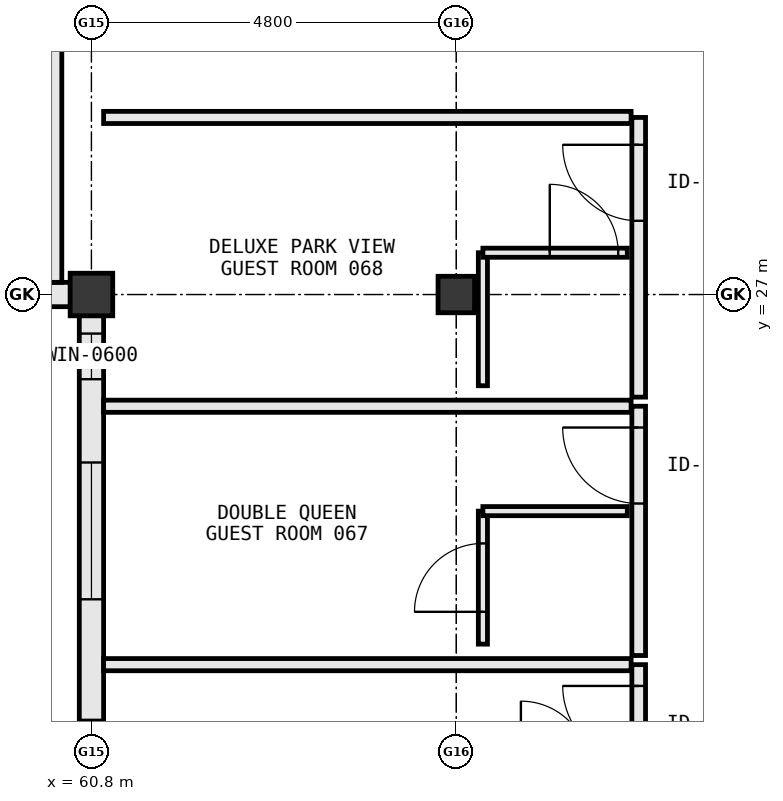
"""IFC4 building model, lengths in metres.
Left out: names, types, materials, properties, quantities, classifications, styles, units other than length and angle.
Written with IfcOpenShell. Run it as: python <this file> out.ifc"""

import sys

from ifc_helpers import new_model, si_unit, direction, frame, frame_2d, origin, origin_2d, place, context, subcontext, project, spatial, rectangle, extrude, element, fill, save


model = new_model("IFC4")
c1 = context("Model", 3, precision=1e-05, world=origin(), true_north=direction((0.0, 1.0)))
c2 = subcontext(c1, "Body", "Model", "MODEL_VIEW")
j1 = project(units=[si_unit("LENGTHUNIT", "METRE"), si_unit("PLANEANGLEUNIT", "RADIAN")], contexts=[c1])
p1 = place(None, origin())
s1 = spatial("IfcSite", under=j1, at=p1, CompositionType="ELEMENT")
p2 = place(p1, origin())
s2 = spatial("IfcBuilding", under=s1, at=p2, CompositionType="ELEMENT")
p3 = place(p2, frame((0.0, 0.0, 16.2)))
s3 = spatial("IfcBuildingStorey", under=s2, at=p3, CompositionType="ELEMENT", Elevation=16.2)
p4 = place(p3, frame((60.8, 27.0, 0.0), z_axis=(0.0, 0.0, 1.0), x_axis=(1.0, 0.0, 0.0)))
e1 = element("IfcColumn", 1, at=p4, inside=s3, PredefinedType="COLUMN", context=c2, shape_type="SweptSolid", body=[
    extrude(rectangle(XDim=0.56, YDim=0.56, at=origin_2d()), origin(), (0.0, 0.0, 1.0), 3.8),
])
p5 = place(p3, frame((65.6, 27.0, 0.0), z_axis=(0.0, 0.0, 1.0), x_axis=(1.0, 0.0, 0.0)))
e2 = element("IfcColumn", 2, at=p5, inside=s3, PredefinedType="COLUMN", context=c2, shape_type="SweptSolid", body=[
    extrude(rectangle(XDim=0.48, YDim=0.48, at=origin_2d()), origin(), (0.0, 0.0, 1.0), 3.8),
])
p6 = place(p3, frame((51.423, 27.0, 0.0), z_axis=(0.0, 0.0, 1.0), x_axis=(1.0, 0.0, 0.0)))
e3 = element("IfcWall", 3, at=p6, inside=s3, PredefinedType="STANDARD", context=c2, shape_type="SweptSolid", body=[
    extrude(rectangle(XDim=9.099, YDim=0.32, at=frame_2d((4.549, 0.0))), origin(), (0.0, 0.0, 1.0), 2.795),
])
p7 = place(p6, frame((1.675, 0.0, 0.85)))
e4 = element("IfcOpeningElement", 4, at=p7, cuts=e3, PredefinedType="OPENING", context=c2, shape_type="SweptSolid", body=[
    extrude(rectangle(XDim=1.2, YDim=1.55, at=frame_2d((0.6, 0.775))), frame((0.0, 0.172, 0.0), z_axis=(0.0, -1.0, 0.0), x_axis=(1.0, 0.0, 0.0)), (0.0, 0.0, 1.0), 0.344),
])
p8 = place(p6, frame((6.224, 0.0, 0.85)))
e5 = element("IfcOpeningElement", 5, at=p8, cuts=e3, PredefinedType="OPENING", context=c2, shape_type="SweptSolid", body=[
    extrude(rectangle(XDim=1.2, YDim=1.55, at=frame_2d((0.6, 0.775))), frame((0.0, 0.172, 0.0), z_axis=(0.0, -1.0, 0.0), x_axis=(1.0, 0.0, 0.0)), (0.0, 0.0, 1.0), 0.344),
])
p9 = place(p3, frame((60.8, 26.722, 0.0), z_axis=(0.0, 0.0, 1.0), x_axis=(0.0, -1.0, 0.0)))
e6 = element("IfcWall", 6, at=p9, inside=s3, PredefinedType="STANDARD", context=c2, shape_type="SweptSolid", body=[
    extrude(rectangle(XDim=7.844, YDim=0.32, at=frame_2d((3.922, 0.0))), origin(), (0.0, 0.0, 1.0), 3.015),
])
p10 = place(p9, frame((5.318, 0.0, 0.85)))
e7 = element("IfcOpeningElement", 7, at=p10, cuts=e6, PredefinedType="OPENING", context=c2, shape_type="SweptSolid", body=[
    extrude(rectangle(XDim=1.8, YDim=1.85, at=frame_2d((0.9, 0.925))), frame((0.0, 0.172, 0.0), z_axis=(0.0, -1.0, 0.0), x_axis=(1.0, 0.0, 0.0)), (0.0, 0.0, 1.0), 0.344),
])
p11 = place(p9, frame((1.932, 0.0, 0.85)))
e8 = element("IfcOpeningElement", 8, at=p11, cuts=e6, PredefinedType="OPENING", context=c2, shape_type="SweptSolid", body=[
    extrude(rectangle(XDim=1.8, YDim=1.85, at=frame_2d((0.9, 0.925))), frame((0.0, 0.172, 0.0), z_axis=(0.0, -1.0, 0.0), x_axis=(1.0, 0.0, 0.0)), (0.0, 0.0, 1.0), 0.344),
])
p12 = place(p9, frame((0.236, 0.0, 0.85)))
e9 = element("IfcOpeningElement", 9, at=p12, cuts=e6, PredefinedType="OPENING", context=c2, shape_type="SweptSolid", body=[
    extrude(rectangle(XDim=0.6, YDim=1.4, at=frame_2d((0.3, 0.7))), frame((0.0, 0.172, 0.0), z_axis=(0.0, -1.0, 0.0), x_axis=(1.0, 0.0, 0.0)), (0.0, 0.0, 1.0), 0.344),
])
p13 = place(p3, frame((68.0, 18.85, 0.0), z_axis=(0.0, 0.0, 1.0), x_axis=(0.0, 1.0, 0.0)))
e10 = element("IfcWall", 10, at=p13, inside=s3, PredefinedType="PARTITIONING", context=c2, shape_type="SweptSolid", body=[
    extrude(rectangle(XDim=3.28, YDim=0.18, at=frame_2d((1.64, 0.0))), origin(), (0.0, 0.0, 1.0), 3.56),
])
p14 = place(p13, frame((2.0, 0.0, 0.0)))
e11 = element("IfcOpeningElement", 11, at=p14, cuts=e10, PredefinedType="OPENING", context=c2, shape_type="SweptSolid", body=[
    extrude(rectangle(XDim=1.0, YDim=2.2, at=frame_2d((0.5, 1.1))), frame((0.0, 0.102, 0.0), z_axis=(0.0, -1.0, 0.0), x_axis=(1.0, 0.0, 0.0)), (0.0, 0.0, 1.0), 0.204),
])
p15 = place(p3, frame((60.96, 22.13, 0.0), z_axis=(0.0, 0.0, 1.0), x_axis=(1.0, 0.0, 0.0)))
e12 = element("IfcWall", 12, at=p15, inside=s3, PredefinedType="PARTITIONING", context=c2, shape_type="SweptSolid", body=[
    extrude(rectangle(XDim=6.94, YDim=0.16, at=frame_2d((3.47, 0.0))), origin(), (0.0, 0.0, 1.0), 3.56),
])
p16 = place(p3, frame((68.0, 22.25, 0.0), z_axis=(0.0, 0.0, 1.0), x_axis=(0.0, 1.0, 0.0)))
e13 = element("IfcWall", 13, at=p16, inside=s3, PredefinedType="PARTITIONING", context=c2, shape_type="SweptSolid", body=[
    extrude(rectangle(XDim=3.28, YDim=0.18, at=frame_2d((1.64, 0.0))), origin(), (0.0, 0.0, 1.0), 3.56),
])
p17 = place(p16, frame((2.0, 0.0, 0.0)))
e14 = element("IfcOpeningElement", 14, at=p17, cuts=e13, PredefinedType="OPENING", context=c2, shape_type="SweptSolid", body=[
    extrude(rectangle(XDim=1.0, YDim=2.2, at=frame_2d((0.5, 1.1))), frame((0.0, 0.102, 0.0), z_axis=(0.0, -1.0, 0.0), x_axis=(1.0, 0.0, 0.0)), (0.0, 0.0, 1.0), 0.204),
])
p18 = place(p3, frame((60.96, 25.53, 0.0), z_axis=(0.0, 0.0, 1.0), x_axis=(1.0, 0.0, 0.0)))
e15 = element("IfcWall", 15, at=p18, inside=s3, PredefinedType="PARTITIONING", context=c2, shape_type="SweptSolid", body=[
    extrude(rectangle(XDim=6.94, YDim=0.16, at=frame_2d((3.47, 0.0))), origin(), (0.0, 0.0, 1.0), 3.56),
])
p19 = place(p3, frame((65.95, 22.4, 0.0), z_axis=(0.0, 0.0, 1.0), x_axis=(0.0, 1.0, 0.0)))
e16 = element("IfcWall", 16, at=p19, inside=s3, PredefinedType="PARTITIONING", context=c2, shape_type="SweptSolid", body=[
    extrude(rectangle(XDim=1.75, YDim=0.12, at=frame_2d((0.875, 0.0))), origin(), (0.0, 0.0, 1.0), 3.015),
])
p20 = place(p19, frame((0.425, 0.0, 0.0)))
e17 = element("IfcOpeningElement", 17, at=p20, cuts=e16, PredefinedType="OPENING", context=c2, shape_type="SweptSolid", body=[
    extrude(rectangle(XDim=0.9, YDim=2.15, at=frame_2d((0.45, 1.075))), frame((0.0, 0.072, 0.0), z_axis=(0.0, -1.0, 0.0), x_axis=(1.0, 0.0, 0.0)), (0.0, 0.0, 1.0), 0.144),
])
p21 = place(p3, frame((65.95, 24.15, 0.0), z_axis=(0.0, 0.0, 1.0), x_axis=(1.0, 0.0, 0.0)))
e18 = element("IfcWall", 18, at=p21, inside=s3, PredefinedType="PARTITIONING", context=c2, shape_type="SweptSolid", body=[
    extrude(rectangle(XDim=1.9, YDim=0.12, at=frame_2d((0.95, 0.0))), origin(), (0.0, 0.0, 1.0), 3.56),
])
p22 = place(p3, frame((68.0, 25.65, 0.0), z_axis=(0.0, 0.0, 1.0), x_axis=(0.0, 1.0, 0.0)))
e19 = element("IfcWall", 19, at=p22, inside=s3, PredefinedType="PARTITIONING", context=c2, shape_type="SweptSolid", body=[
    extrude(rectangle(XDim=3.68, YDim=0.18, at=frame_2d((1.84, 0.0))), origin(), (0.0, 0.0, 1.0), 3.56),
])
p23 = place(p22, frame((2.32, 0.0, 0.0)))
e20 = element("IfcOpeningElement", 20, at=p23, cuts=e19, PredefinedType="OPENING", context=c2, shape_type="SweptSolid", body=[
    extrude(rectangle(XDim=1.0, YDim=2.2, at=frame_2d((0.5, 1.1))), frame((0.0, 0.102, 0.0), z_axis=(0.0, -1.0, 0.0), x_axis=(1.0, 0.0, 0.0)), (0.0, 0.0, 1.0), 0.204),
])
p24 = place(p3, frame((60.96, 29.33, 0.0), z_axis=(0.0, 0.0, 1.0), x_axis=(1.0, 0.0, 0.0)))
e21 = element("IfcWall", 21, at=p24, inside=s3, PredefinedType="PARTITIONING", context=c2, shape_type="SweptSolid", body=[
    extrude(rectangle(XDim=6.94, YDim=0.16, at=frame_2d((3.47, 0.0))), origin(), (0.0, 0.0, 1.0), 3.56),
])
p25 = place(p3, frame((65.95, 25.8, 0.0), z_axis=(0.0, 0.0, 1.0), x_axis=(0.0, 1.0, 0.0)))
e22 = element("IfcWall", 22, at=p25, inside=s3, PredefinedType="PARTITIONING", context=c2, shape_type="SweptSolid", body=[
    extrude(rectangle(XDim=1.75, YDim=0.12, at=frame_2d((0.875, 0.0))), origin(), (0.0, 0.0, 1.0), 3.015),
])
p26 = place(p3, frame((65.95, 27.55, 0.0), z_axis=(0.0, 0.0, 1.0), x_axis=(1.0, 0.0, 0.0)))
e23 = element("IfcWall", 23, at=p26, inside=s3, PredefinedType="PARTITIONING", context=c2, shape_type="SweptSolid", body=[
    extrude(rectangle(XDim=1.9, YDim=0.12, at=frame_2d((0.95, 0.0))), origin(), (0.0, 0.0, 1.0), 3.56),
])
p27 = place(p26, frame((0.88, 0.0, 0.0)))
e24 = element("IfcOpeningElement", 24, at=p27, cuts=e23, PredefinedType="OPENING", context=c2, shape_type="SweptSolid", body=[
    extrude(rectangle(XDim=0.9, YDim=2.15, at=frame_2d((0.45, 1.075))), frame((0.0, 0.072, 0.0), z_axis=(0.0, -1.0, 0.0), x_axis=(1.0, 0.0, 0.0)), (0.0, 0.0, 1.0), 0.144),
])
p28 = place(p3, frame((60.33, 27.16, 0.0), z_axis=(0.0, 0.0, 1.0), x_axis=(0.0, 1.0, 0.0)))
e25 = element("IfcWall", 25, at=p28, inside=s3, PredefinedType="PARTITIONING", context=c2, shape_type="SweptSolid", body=[
    extrude(rectangle(XDim=10.34, YDim=0.16, at=frame_2d((5.17, 0.0))), origin(), (0.0, 0.0, 1.0), 3.56),
])
p29 = place(p10, origin())
e26 = element("IfcWindow", 26, at=p29, inside=s3, PartitioningType="SINGLE_PANEL", PredefinedType="WINDOW", context=c2, shape_type="SweptSolid", body=[
    extrude(rectangle(XDim=1.8, YDim=1.85, at=frame_2d((0.9, 0.925))), frame((0.0, 0.03, 0.0), z_axis=(0.0, -1.0, 0.0), x_axis=(1.0, 0.0, 0.0)), (0.0, 0.0, 1.0), 0.06),
])
fill(e7, e26)
p30 = place(p11, origin())
e27 = element("IfcWindow", 27, at=p30, inside=s3, PartitioningType="SINGLE_PANEL", PredefinedType="WINDOW", context=c2, shape_type="SweptSolid", body=[
    extrude(rectangle(XDim=1.8, YDim=1.85, at=frame_2d((0.9, 0.925))), frame((0.0, 0.03, 0.0), z_axis=(0.0, -1.0, 0.0), x_axis=(1.0, 0.0, 0.0)), (0.0, 0.0, 1.0), 0.06),
])
fill(e8, e27)
p31 = place(p12, origin())
e28 = element("IfcWindow", 28, at=p31, inside=s3, PartitioningType="SINGLE_PANEL", PredefinedType="WINDOW", context=c2, shape_type="SweptSolid", body=[
    extrude(rectangle(XDim=0.6, YDim=1.4, at=frame_2d((0.3, 0.7))), frame((0.0, 0.03, 0.0), z_axis=(0.0, -1.0, 0.0), x_axis=(1.0, 0.0, 0.0)), (0.0, 0.0, 1.0), 0.06),
])
fill(e9, e28)
p32 = place(p14, origin())
e29 = element("IfcDoor", 29, at=p32, inside=s3, OperationType="SINGLE_SWING_RIGHT", PredefinedType="DOOR", context=c2, shape_type="SweptSolid", body=[
    extrude(rectangle(XDim=1.0, YDim=2.2, at=frame_2d((0.5, 1.1))), frame((0.0, 0.025, 0.0), z_axis=(0.0, -1.0, 0.0), x_axis=(1.0, 0.0, 0.0)), (0.0, 0.0, 1.0), 0.05),
])
fill(e11, e29)
p33 = place(p17, origin())
e30 = element("IfcDoor", 30, at=p33, inside=s3, OperationType="SINGLE_SWING_RIGHT", PredefinedType="DOOR", context=c2, shape_type="SweptSolid", body=[
    extrude(rectangle(XDim=1.0, YDim=2.2, at=frame_2d((0.5, 1.1))), frame((0.0, 0.025, 0.0), z_axis=(0.0, -1.0, 0.0), x_axis=(1.0, 0.0, 0.0)), (0.0, 0.0, 1.0), 0.05),
])
fill(e14, e30)
p34 = place(p20, origin())
e31 = element("IfcDoor", 31, at=p34, inside=s3, OperationType="SINGLE_SWING_LEFT", PredefinedType="DOOR", context=c2, shape_type="SweptSolid", body=[
    extrude(rectangle(XDim=0.9, YDim=2.15, at=frame_2d((0.45, 1.075))), frame((0.0, 0.025, 0.0), z_axis=(0.0, -1.0, 0.0), x_axis=(1.0, 0.0, 0.0)), (0.0, 0.0, 1.0), 0.05),
])
fill(e17, e31)
p35 = place(p23, origin())
e32 = element("IfcDoor", 32, at=p35, inside=s3, OperationType="SINGLE_SWING_RIGHT", PredefinedType="DOOR", context=c2, shape_type="SweptSolid", body=[
    extrude(rectangle(XDim=1.0, YDim=2.2, at=frame_2d((0.5, 1.1))), frame((0.0, 0.025, 0.0), z_axis=(0.0, -1.0, 0.0), x_axis=(1.0, 0.0, 0.0)), (0.0, 0.0, 1.0), 0.05),
])
fill(e20, e32)
p36 = place(p27, origin())
e33 = element("IfcDoor", 33, at=p36, inside=s3, OperationType="SINGLE_SWING_LEFT", PredefinedType="DOOR", context=c2, shape_type="SweptSolid", body=[
    extrude(rectangle(XDim=0.9, YDim=2.15, at=frame_2d((0.45, 1.075))), frame((0.0, 0.025, 0.0), z_axis=(0.0, -1.0, 0.0), x_axis=(1.0, 0.0, 0.0)), (0.0, 0.0, 1.0), 0.05),
])
fill(e24, e33)
save(model, sys.argv[1])
